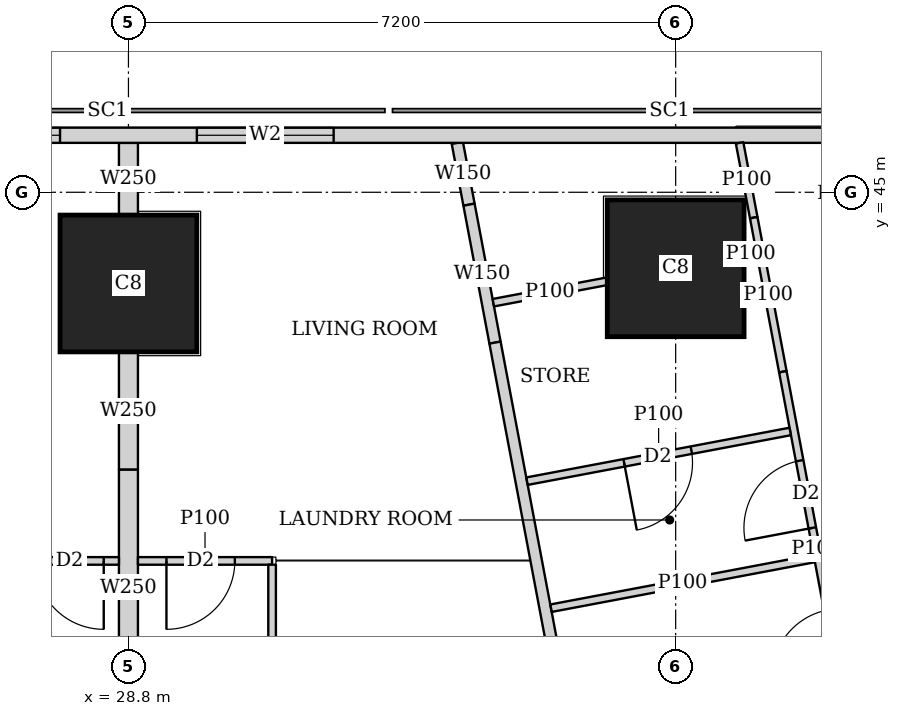
"""IFC4 building model, lengths in metres.
Left out: names, types, materials, properties, quantities, classifications, styles, units other than length and angle.
Written with IfcOpenShell. Run it as: python <this file> out.ifc"""

import sys

from ifc_helpers import new_model, si_unit, direction, frame, frame_2d, origin, origin_2d, place, context, subcontext, project, spatial, rectangle, extrude, element, fill, save


model = new_model("IFC4")
c1 = context("Model", 3, precision=1e-05, world=origin(), true_north=direction((0.0, 1.0)))
c2 = subcontext(c1, "Body", "Model", "MODEL_VIEW")
j1 = project(units=[si_unit("LENGTHUNIT", "METRE"), si_unit("PLANEANGLEUNIT", "RADIAN")], contexts=[c1])
p1 = place(None, origin())
s1 = spatial("IfcSite", under=j1, at=p1, CompositionType="ELEMENT")
p2 = place(p1, origin())
s2 = spatial("IfcBuilding", under=s1, at=p2, CompositionType="ELEMENT")
p3 = place(p2, frame((0.0, 0.0, 184.55)))
s3 = spatial("IfcBuildingStorey", under=s2, at=p3, CompositionType="ELEMENT", Elevation=184.55)
for number, where, z_axis, x_axis in (
    (1, (28.8, 43.8, 0.0), (0.0, 0.0, 1.0), (1.0, 0.0, 0.0)),
    (2, (36.0, 44.0, 0.0), (0.0, 0.0, 1.0), (1.0, 0.0, 0.0)),
):
    element("IfcColumn", number, at=place(p3, frame(where, z_axis=z_axis, x_axis=x_axis)), inside=s3, PredefinedType="COLUMN", context=c2, shape_type="SweptSolid", body=[
        extrude(rectangle(XDim=1.8, YDim=1.8, at=origin_2d()), origin(), (0.0, 0.0, 1.0), 3.75),
    ])
p4 = place(p3, frame((40.106, 45.75, 0.0), z_axis=(0.0, 0.0, 1.0), x_axis=(-1.0, 0.0, 0.0)))
e3 = element("IfcWall", 3, at=p4, inside=s3, PredefinedType="SOLIDWALL", context=c2, shape_type="SweptSolid", body=[
    extrude(rectangle(XDim=37.943, YDim=0.2, at=frame_2d((18.971, 0.0))), origin(), (0.0, 0.0, 1.0), 3.45),
])
p5 = place(p4, frame((8.606, 0.0, 0.9)))
e4 = element("IfcOpeningElement", 4, at=p5, cuts=e3, PredefinedType="OPENING", context=c2, shape_type="SweptSolid", body=[
    extrude(rectangle(XDim=1.8, YDim=1.5, at=frame_2d((0.9, 0.75))), frame((0.0, 0.11, 0.0), z_axis=(0.0, -1.0, 0.0), x_axis=(1.0, 0.0, 0.0)), (0.0, 0.0, 1.0), 0.22),
])
p6 = place(p4, frame((12.206, 0.0, 0.9)))
e5 = element("IfcOpeningElement", 5, at=p6, cuts=e3, PredefinedType="OPENING", context=c2, shape_type="SweptSolid", body=[
    extrude(rectangle(XDim=1.8, YDim=1.5, at=frame_2d((0.9, 0.75))), frame((0.0, 0.11, 0.0), z_axis=(0.0, -1.0, 0.0), x_axis=(1.0, 0.0, 0.0)), (0.0, 0.0, 1.0), 0.22),
])
p7 = place(p4, frame((15.806, 0.0, 0.9)))
e6 = element("IfcOpeningElement", 6, at=p7, cuts=e3, PredefinedType="OPENING", context=c2, shape_type="SweptSolid", body=[
    extrude(rectangle(XDim=1.8, YDim=1.5, at=frame_2d((0.9, 0.75))), frame((0.0, 0.11, 0.0), z_axis=(0.0, -1.0, 0.0), x_axis=(1.0, 0.0, 0.0)), (0.0, 0.0, 1.0), 0.22),
])
p8 = place(p4, frame((19.406, 0.0, 0.9)))
e7 = element("IfcOpeningElement", 7, at=p8, cuts=e3, PredefinedType="OPENING", context=c2, shape_type="SweptSolid", body=[
    extrude(rectangle(XDim=1.8, YDim=1.5, at=frame_2d((0.9, 0.75))), frame((0.0, 0.11, 0.0), z_axis=(0.0, -1.0, 0.0), x_axis=(1.0, 0.0, 0.0)), (0.0, 0.0, 1.0), 0.22),
])
p9 = place(p4, frame((23.006, 0.0, 0.9)))
e8 = element("IfcOpeningElement", 8, at=p9, cuts=e3, PredefinedType="OPENING", context=c2, shape_type="SweptSolid", body=[
    extrude(rectangle(XDim=1.8, YDim=1.5, at=frame_2d((0.9, 0.75))), frame((0.0, 0.11, 0.0), z_axis=(0.0, -1.0, 0.0), x_axis=(1.0, 0.0, 0.0)), (0.0, 0.0, 1.0), 0.22),
])
p10 = place(p4, frame((26.606, 0.0, 0.9)))
e9 = element("IfcOpeningElement", 9, at=p10, cuts=e3, PredefinedType="OPENING", context=c2, shape_type="SweptSolid", body=[
    extrude(rectangle(XDim=1.8, YDim=1.5, at=frame_2d((0.9, 0.75))), frame((0.0, 0.11, 0.0), z_axis=(0.0, -1.0, 0.0), x_axis=(1.0, 0.0, 0.0)), (0.0, 0.0, 1.0), 0.22),
])
p11 = place(p3, frame((33.127, 45.65, 0.0), z_axis=(0.0, 0.0, 1.0), x_axis=(0.186176514576, -0.982516313056, 0.0)))
e10 = element("IfcWall", 10, at=p11, inside=s3, PredefinedType="SOLIDWALL", context=c2, shape_type="SweptSolid", body=[
    extrude(rectangle(XDim=0.827, YDim=0.15, at=frame_2d((0.414, 0.0))), origin(), (0.0, 0.0, 1.0), 3.45),
])
p12 = place(p3, frame((33.281, 44.837, 0.0), z_axis=(0.0, 0.0, 1.0), x_axis=(0.185198323004, -0.982701165745, 0.0)))
e11 = element("IfcWall", 11, at=p12, inside=s3, PredefinedType="SOLIDWALL", context=c2, shape_type="SweptSolid", body=[
    extrude(rectangle(XDim=1.847, YDim=0.15, at=frame_2d((0.923, 0.0))), origin(), (0.0, 0.0, 1.0), 2.05),
])
p13 = place(p3, frame((33.623, 43.022, 0.0), z_axis=(0.0, 0.0, 1.0), x_axis=(0.185596841028, -0.98262597798, 0.0)))
e12 = element("IfcWall", 12, at=p13, inside=s3, PredefinedType="SOLIDWALL", context=c2, shape_type="SweptSolid", body=[
    extrude(rectangle(XDim=41.66, YDim=0.15, at=frame_2d((20.83, 0.0))), origin(), (0.0, 0.0, 1.0), 2.45),
])
p14 = place(p13, frame((8.034, 0.0, 0.0)))
e13 = element("IfcOpeningElement", 13, at=p14, cuts=e12, PredefinedType="OPENING", context=c2, shape_type="SweptSolid", body=[
    extrude(rectangle(XDim=1.0, YDim=2.1, at=frame_2d((0.5, 1.05))), frame((0.0, 0.085, 0.0), z_axis=(0.0, -1.0, 0.0), x_axis=(1.0, 0.0, 0.0)), (0.0, 0.0, 1.0), 0.17),
])
p15 = place(p13, frame((12.611, 0.0, 0.0)))
e14 = element("IfcOpeningElement", 14, at=p15, cuts=e12, PredefinedType="OPENING", context=c2, shape_type="SweptSolid", body=[
    extrude(rectangle(XDim=1.0, YDim=2.1, at=frame_2d((0.5, 1.05))), frame((0.0, 0.085, 0.0), z_axis=(0.0, -1.0, 0.0), x_axis=(1.0, 0.0, 0.0)), (0.0, 0.0, 1.0), 0.17),
])
p16 = place(p13, frame((20.242, 0.0, 0.0)))
e15 = element("IfcOpeningElement", 15, at=p16, cuts=e12, PredefinedType="OPENING", context=c2, shape_type="SweptSolid", body=[
    extrude(rectangle(XDim=1.0, YDim=2.1, at=frame_2d((0.5, 1.05))), frame((0.0, 0.085, 0.0), z_axis=(0.0, -1.0, 0.0), x_axis=(1.0, 0.0, 0.0)), (0.0, 0.0, 1.0), 0.17),
])
p17 = place(p13, frame((31.206, 0.0, 0.0)))
e16 = element("IfcOpeningElement", 16, at=p17, cuts=e12, PredefinedType="OPENING", context=c2, shape_type="SweptSolid", body=[
    extrude(rectangle(XDim=1.0, YDim=2.1, at=frame_2d((0.5, 1.05))), frame((0.0, 0.085, 0.0), z_axis=(0.0, -1.0, 0.0), x_axis=(1.0, 0.0, 0.0)), (0.0, 0.0, 1.0), 0.17),
])
p18 = place(p3, frame((36.841, 45.65, 0.0), z_axis=(0.0, 0.0, 1.0), x_axis=(0.185789875365, -0.982589498322, 0.0)))
e17 = element("IfcWall", 17, at=p18, inside=s3, PredefinedType="PARTITIONING", context=c2, shape_type="SweptSolid", body=[
    extrude(rectangle(XDim=1.001, YDim=0.1, at=frame_2d((0.5, 0.0))), origin(), (0.0, 0.0, 1.0), 3.45),
])
p19 = place(p3, frame((37.027, 44.666, 0.0), z_axis=(0.0, 0.0, 1.0), x_axis=(0.1855674151, -0.982631535446, 0.0)))
e18 = element("IfcWall", 18, at=p19, inside=s3, PredefinedType="PARTITIONING", context=c2, shape_type="SweptSolid", body=[
    extrude(rectangle(XDim=2.063, YDim=0.1, at=frame_2d((1.031, 0.0))), origin(), (0.0, 0.0, 1.0), 2.05),
])
p20 = place(p3, frame((37.41, 42.639, 0.0), z_axis=(0.0, 0.0, 1.0), x_axis=(0.185579683022, -0.982629218601, 0.0)))
e19 = element("IfcWall", 19, at=p20, inside=s3, PredefinedType="PARTITIONING", context=c2, shape_type="SweptSolid", body=[
    extrude(rectangle(XDim=4.737, YDim=0.1, at=frame_2d((2.369, 0.0))), origin(), (0.0, 0.0, 1.0), 3.45),
])
p21 = place(p20, frame((3.189, 0.0, 0.0)))
e20 = element("IfcOpeningElement", 20, at=p21, cuts=e19, PredefinedType="OPENING", context=c2, shape_type="SweptSolid", body=[
    extrude(rectangle(XDim=0.9, YDim=2.1, at=frame_2d((0.45, 1.05))), frame((0.0, 0.06, 0.0), z_axis=(0.0, -1.0, 0.0), x_axis=(1.0, 0.0, 0.0)), (0.0, 0.0, 1.0), 0.12),
])
p22 = place(p20, frame((1.191, 0.0, 0.0)))
e21 = element("IfcOpeningElement", 21, at=p22, cuts=e19, PredefinedType="OPENING", context=c2, shape_type="SweptSolid", body=[
    extrude(rectangle(XDim=0.9, YDim=2.1, at=frame_2d((0.45, 1.05))), frame((0.0, 0.06, 0.0), z_axis=(0.0, -1.0, 0.0), x_axis=(1.0, 0.0, 0.0)), (0.0, 0.0, 1.0), 0.12),
])
p23 = place(p3, frame((37.064, 44.201, 0.0), z_axis=(0.0, 0.0, 1.0), x_axis=(-0.982960250751, -0.183818240236, 0.0)))
e22 = element("IfcWall", 22, at=p23, inside=s3, PredefinedType="PARTITIONING", context=c2, shape_type="SweptSolid", body=[
    extrude(rectangle(XDim=0.157, YDim=0.1, at=frame_2d((0.078, 0.0))), origin(), (0.0, 0.0, 1.0), 2.05),
])
p24 = place(p3, frame((35.09, 43.828, 0.0), z_axis=(0.0, 0.0, 1.0), x_axis=(-0.982683801717, -0.185290436461, 0.0)))
e23 = element("IfcWall", 23, at=p24, inside=s3, PredefinedType="PARTITIONING", context=c2, shape_type="SweptSolid", body=[
    extrude(rectangle(XDim=1.515, YDim=0.1, at=frame_2d((0.758, 0.0))), origin(), (0.0, 0.0, 1.0), 2.05),
])
p25 = place(p3, frame((37.823, 40.182, 0.0), z_axis=(0.0, 0.0, 1.0), x_axis=(-0.98263926043, -0.185526504472, 0.0)))
e24 = element("IfcWall", 24, at=p25, inside=s3, PredefinedType="PARTITIONING", context=c2, shape_type="SweptSolid", body=[
    extrude(rectangle(XDim=3.524, YDim=0.1, at=frame_2d((1.762, 0.0))), origin(), (0.0, 0.0, 1.0), 3.45),
])
p26 = place(p3, frame((37.507, 41.853, 0.0), z_axis=(0.0, 0.0, 1.0), x_axis=(-0.982629014545, -0.18558076348, 0.0)))
e25 = element("IfcWall", 25, at=p26, inside=s3, PredefinedType="PARTITIONING", context=c2, shape_type="SweptSolid", body=[
    extrude(rectangle(XDim=3.524, YDim=0.1, at=frame_2d((1.762, 0.0))), origin(), (0.0, 0.0, 1.0), 3.45),
])
p27 = place(p26, frame((1.324, 0.0, 0.0)))
e26 = element("IfcOpeningElement", 26, at=p27, cuts=e25, PredefinedType="OPENING", context=c2, shape_type="SweptSolid", body=[
    extrude(rectangle(XDim=0.9, YDim=2.1, at=frame_2d((0.45, 1.05))), frame((0.0, 0.06, 0.0), z_axis=(0.0, -1.0, 0.0), x_axis=(1.0, 0.0, 0.0)), (0.0, 0.0, 1.0), 0.12),
])
p28 = place(p3, frame((25.2, 40.15, 0.0), z_axis=(0.0, 0.0, 1.0), x_axis=(1.0, 0.0, 0.0)))
e27 = element("IfcWall", 27, at=p28, inside=s3, PredefinedType="PARTITIONING", context=c2, shape_type="SweptSolid", body=[
    extrude(rectangle(XDim=3.475, YDim=0.1, at=frame_2d((1.738, 0.0))), origin(), (0.0, 0.0, 1.0), 3.45),
])
p29 = place(p28, frame((0.575, 0.0, 0.0)))
e28 = element("IfcOpeningElement", 28, at=p29, cuts=e27, PredefinedType="OPENING", context=c2, shape_type="SweptSolid", body=[
    extrude(rectangle(XDim=0.9, YDim=2.1, at=frame_2d((0.45, 1.05))), frame((0.0, 0.06, 0.0), z_axis=(0.0, -1.0, 0.0), x_axis=(1.0, 0.0, 0.0)), (0.0, 0.0, 1.0), 0.12),
])
p30 = place(p28, frame((2.375, 0.0, 0.0)))
e29 = element("IfcOpeningElement", 29, at=p30, cuts=e27, PredefinedType="OPENING", context=c2, shape_type="SweptSolid", body=[
    extrude(rectangle(XDim=0.9, YDim=2.1, at=frame_2d((0.45, 1.05))), frame((0.0, 0.06, 0.0), z_axis=(0.0, -1.0, 0.0), x_axis=(1.0, 0.0, 0.0)), (0.0, 0.0, 1.0), 0.12),
])
p31 = place(p3, frame((28.925, 40.15, 0.0), z_axis=(0.0, 0.0, 1.0), x_axis=(1.0, 0.0, 0.0)))
e30 = element("IfcWall", 30, at=p31, inside=s3, PredefinedType="PARTITIONING", context=c2, shape_type="SweptSolid", body=[
    extrude(rectangle(XDim=1.765, YDim=0.1, at=frame_2d((0.882, 0.0))), origin(), (0.0, 0.0, 1.0), 3.45),
])
p32 = place(p31, frame((0.375, 0.0, 0.0)))
e31 = element("IfcOpeningElement", 31, at=p32, cuts=e30, PredefinedType="OPENING", context=c2, shape_type="SweptSolid", body=[
    extrude(rectangle(XDim=0.9, YDim=2.1, at=frame_2d((0.45, 1.05))), frame((0.0, 0.06, 0.0), z_axis=(0.0, -1.0, 0.0), x_axis=(1.0, 0.0, 0.0)), (0.0, 0.0, 1.0), 0.12),
])
p33 = place(p3, frame((30.69, 36.575, 0.0), z_axis=(0.0, 0.0, 1.0), x_axis=(0.0, 1.0, 0.0)))
e32 = element("IfcWall", 32, at=p33, inside=s3, PredefinedType="PARTITIONING", context=c2, shape_type="SweptSolid", body=[
    extrude(rectangle(XDim=3.525, YDim=0.1, at=frame_2d((1.763, 0.0))), origin(), (0.0, 0.0, 1.0), 3.45),
])
p34 = place(p3, frame((28.8, 41.35, 0.0), z_axis=(0.0, 0.0, 1.0), x_axis=(0.0, 1.0, 0.0)))
e33 = element("IfcWall", 33, at=p34, inside=s3, PredefinedType="SOLIDWALL", context=c2, shape_type="SweptSolid", body=[
    extrude(rectangle(XDim=1.549, YDim=0.25, at=frame_2d((0.774, 0.0))), origin(), (0.0, 0.0, 1.0), 2.05),
])
p35 = place(p3, frame((28.8, 44.701, 0.0), z_axis=(0.0, 0.0, 1.0), x_axis=(0.0, 1.0, 0.0)))
e34 = element("IfcWall", 34, at=p35, inside=s3, PredefinedType="SOLIDWALL", context=c2, shape_type="SweptSolid", body=[
    extrude(rectangle(XDim=0.949, YDim=0.25, at=frame_2d((0.475, 0.0))), origin(), (0.0, 0.0, 1.0), 2.05),
])
p36 = place(p3, frame((28.8, 38.251, 0.0), z_axis=(0.0, 0.0, 1.0), x_axis=(0.0, 1.0, 0.0)))
e35 = element("IfcWall", 35, at=p36, inside=s3, PredefinedType="SOLIDWALL", context=c2, shape_type="SweptSolid", body=[
    extrude(rectangle(XDim=3.099, YDim=0.25, at=frame_2d((1.55, 0.0))), origin(), (0.0, 0.0, 1.0), 3.45),
])
p37 = place(p5, origin())
e36 = element("IfcWindow", 36, at=p37, inside=s3, PartitioningType="SINGLE_PANEL", PredefinedType="WINDOW", context=c2, shape_type="SweptSolid", body=[
    extrude(rectangle(XDim=1.8, YDim=1.5, at=frame_2d((0.9, 0.75))), frame((0.0, 0.03, 0.0), z_axis=(0.0, -1.0, 0.0), x_axis=(1.0, 0.0, 0.0)), (0.0, 0.0, 1.0), 0.06),
])
fill(e4, e36)
p38 = place(p6, origin())
e37 = element("IfcWindow", 37, at=p38, inside=s3, PartitioningType="SINGLE_PANEL", PredefinedType="WINDOW", context=c2, shape_type="SweptSolid", body=[
    extrude(rectangle(XDim=1.8, YDim=1.5, at=frame_2d((0.9, 0.75))), frame((0.0, 0.03, 0.0), z_axis=(0.0, -1.0, 0.0), x_axis=(1.0, 0.0, 0.0)), (0.0, 0.0, 1.0), 0.06),
])
fill(e5, e37)
p39 = place(p22, origin())
e38 = element("IfcDoor", 38, at=p39, inside=s3, OperationType="SINGLE_SWING_LEFT", PredefinedType="DOOR", context=c2, shape_type="SweptSolid", body=[
    extrude(rectangle(XDim=0.9, YDim=2.1, at=frame_2d((0.45, 1.05))), frame((0.0, 0.025, 0.0), z_axis=(0.0, -1.0, 0.0), x_axis=(1.0, 0.0, 0.0)), (0.0, 0.0, 1.0), 0.05),
])
fill(e21, e38)
p40 = place(p27, origin())
e39 = element("IfcDoor", 39, at=p40, inside=s3, OperationType="SINGLE_SWING_RIGHT", PredefinedType="DOOR", context=c2, shape_type="SweptSolid", body=[
    extrude(rectangle(XDim=0.9, YDim=2.1, at=frame_2d((0.45, 1.05))), frame((0.0, 0.025, 0.0), z_axis=(0.0, -1.0, 0.0), x_axis=(1.0, 0.0, 0.0)), (0.0, 0.0, 1.0), 0.05),
])
fill(e26, e39)
p41 = place(p30, origin())
e40 = element("IfcDoor", 40, at=p41, inside=s3, OperationType="SINGLE_SWING_LEFT", PredefinedType="DOOR", context=c2, shape_type="SweptSolid", body=[
    extrude(rectangle(XDim=0.9, YDim=2.1, at=frame_2d((0.45, 1.05))), frame((0.0, 0.025, 0.0), z_axis=(0.0, -1.0, 0.0), x_axis=(1.0, 0.0, 0.0)), (0.0, 0.0, 1.0), 0.05),
])
fill(e29, e40)
p42 = place(p32, origin())
e41 = element("IfcDoor", 41, at=p42, inside=s3, OperationType="SINGLE_SWING_RIGHT", PredefinedType="DOOR", context=c2, shape_type="SweptSolid", body=[
    extrude(rectangle(XDim=0.9, YDim=2.1, at=frame_2d((0.45, 1.05))), frame((0.0, 0.025, 0.0), z_axis=(0.0, -1.0, 0.0), x_axis=(1.0, 0.0, 0.0)), (0.0, 0.0, 1.0), 0.05),
])
fill(e31, e41)
save(model, sys.argv[1])
